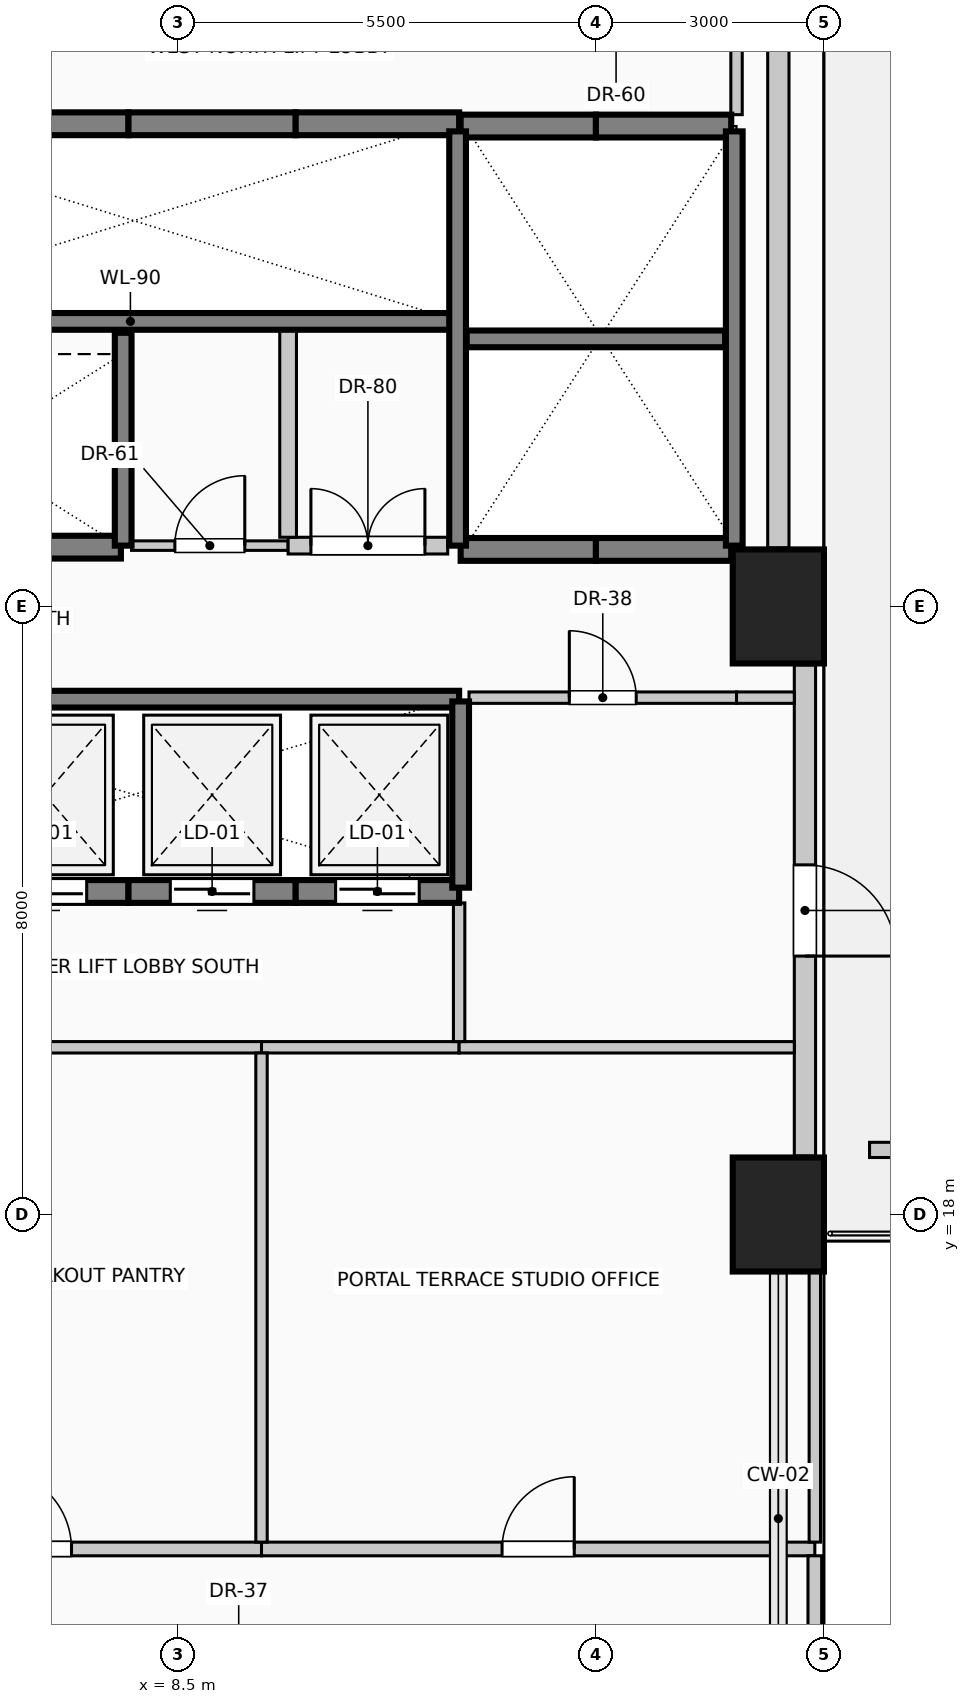
"""IFC4 building model, lengths in metres.
Left out: names, types, materials, properties, quantities, classifications, styles, units other than length and angle.
Written with IfcOpenShell. Run it as: python <this file> out.ifc"""

import sys

from ifc_helpers import new_model, si_unit, direction, frame, frame_2d, origin, origin_2d, place, context, subcontext, project, spatial, rectangle, extrude, element, fill, save


model = new_model("IFC4")
c1 = context("Model", 3, precision=1e-05, world=origin(), true_north=direction((0.0, 1.0)))
c2 = subcontext(c1, "Body", "Model", "MODEL_VIEW")
j1 = project(units=[si_unit("LENGTHUNIT", "METRE"), si_unit("PLANEANGLEUNIT", "RADIAN")], contexts=[c1])
p1 = place(None, origin())
s1 = spatial("IfcSite", under=j1, at=p1, CompositionType="ELEMENT")
p2 = place(p1, origin())
s2 = spatial("IfcBuilding", under=s1, at=p2, CompositionType="ELEMENT")
p3 = place(p2, frame((0.0, 0.0, 38.6)))
s3 = spatial("IfcBuildingStorey", under=s2, at=p3, CompositionType="ELEMENT", Elevation=38.6)
for number, where, z_axis, x_axis in (
    (1, (16.4, 18.0, 0.0), (0.0, 0.0, 1.0), (1.0, 0.0, 0.0)),
    (2, (16.4, 26.0, 0.0), (0.0, 0.0, 1.0), (1.0, 0.0, 0.0)),
):
    element("IfcColumn", number, at=place(p3, frame(where, z_axis=z_axis, x_axis=x_axis)), inside=s3, PredefinedType="COLUMN", context=c2, shape_type="SweptSolid", body=[
        extrude(rectangle(XDim=1.2, YDim=1.5, at=origin_2d()), origin(), (0.0, 0.0, 1.0), 4.0),
    ])
p4 = place(p3, frame((16.75, 25.23, 0.0), z_axis=(0.0, 0.0, 1.0), x_axis=(0.0, -1.0, 0.0)))
e3 = element("IfcWall", 3, at=p4, inside=s3, PredefinedType="SOLIDWALL", context=c2, shape_type="SweptSolid", body=[
    extrude(rectangle(XDim=6.46, YDim=0.28, at=frame_2d((3.23, 0.0))), origin(), (0.0, 0.0, 1.0), 3.7),
])
p5 = place(p4, frame((2.63, 0.0, 0.0)))
e4 = element("IfcOpeningElement", 4, at=p5, cuts=e3, PredefinedType="OPENING", context=c2, shape_type="SweptSolid", body=[
    extrude(rectangle(XDim=1.2, YDim=2.25, at=frame_2d((0.6, 1.125))), frame((0.0, 0.15, 0.0), z_axis=(0.0, -1.0, 0.0), x_axis=(1.0, 0.0, 0.0)), (0.0, 0.0, 1.0), 0.3),
])
p6 = place(p3, frame((16.4, 33.48, 0.0), z_axis=(0.0, 0.0, 1.0), x_axis=(0.0, -1.0, 0.0)))
e5 = element("IfcWall", 5, at=p6, inside=s3, PredefinedType="SOLIDWALL", context=c2, shape_type="SweptSolid", body=[
    extrude(rectangle(XDim=6.71, YDim=0.28, at=frame_2d((3.355, 0.0))), origin(), (0.0, 0.0, 1.0), 3.0),
])
p7 = place(p3, frame((17.6, 18.85, 0.0), z_axis=(0.0, 0.0, 1.0), x_axis=(1.0, 0.0, 0.0)))
e6 = element("IfcWall", 6, at=p7, inside=s3, PredefinedType="USERDEFINED", context=c2, shape_type="SweptSolid", body=[
    extrude(rectangle(XDim=22.8, YDim=0.2, at=frame_2d((11.4, 0.0))), origin(), (0.0, 0.0, 1.0), 0.55),
])
p8 = place(p3, frame((7.85, 22.25, 0.0), z_axis=(0.0, 0.0, 1.0), x_axis=(-1.0, 0.0, 0.0)))
e7 = element("IfcWall", 7, at=p8, inside=s3, PredefinedType="SOLIDWALL", context=c2, shape_type="SweptSolid", body=[
    extrude(rectangle(XDim=2.2, YDim=0.3, at=frame_2d((1.1, 0.0))), origin(), (0.0, 0.0, 1.0), 4.0),
])
p9 = place(p8, frame((0.55, 0.0, 0.0)))
e8 = element("IfcOpeningElement", 8, at=p9, cuts=e7, PredefinedType="OPENING", context=c2, shape_type="SweptSolid", body=[
    extrude(rectangle(XDim=1.1, YDim=2.2, at=frame_2d((0.55, 1.1))), frame((0.0, 0.16, 0.0), z_axis=(0.0, -1.0, 0.0), x_axis=(1.0, 0.0, 0.0)), (0.0, 0.0, 1.0), 0.32),
])
p10 = place(p3, frame((10.05, 22.25, 0.0), z_axis=(0.0, 0.0, 1.0), x_axis=(-1.0, 0.0, 0.0)))
e9 = element("IfcWall", 9, at=p10, inside=s3, PredefinedType="SOLIDWALL", context=c2, shape_type="SweptSolid", body=[
    extrude(rectangle(XDim=2.2, YDim=0.3, at=frame_2d((1.1, 0.0))), origin(), (0.0, 0.0, 1.0), 4.0),
])
p11 = place(p10, frame((0.55, 0.0, 0.0)))
e10 = element("IfcOpeningElement", 10, at=p11, cuts=e9, PredefinedType="OPENING", context=c2, shape_type="SweptSolid", body=[
    extrude(rectangle(XDim=1.1, YDim=2.2, at=frame_2d((0.55, 1.1))), frame((0.0, 0.16, 0.0), z_axis=(0.0, -1.0, 0.0), x_axis=(1.0, 0.0, 0.0)), (0.0, 0.0, 1.0), 0.32),
])
p12 = place(p3, frame((12.2, 22.25, 0.0), z_axis=(0.0, 0.0, 1.0), x_axis=(-1.0, 0.0, 0.0)))
e11 = element("IfcWall", 11, at=p12, inside=s3, PredefinedType="SOLIDWALL", context=c2, shape_type="SweptSolid", body=[
    extrude(rectangle(XDim=2.15, YDim=0.3, at=frame_2d((1.075, 0.0))), origin(), (0.0, 0.0, 1.0), 4.0),
])
p13 = place(p12, frame((0.525, 0.0, 0.0)))
e12 = element("IfcOpeningElement", 12, at=p13, cuts=e11, PredefinedType="OPENING", context=c2, shape_type="SweptSolid", body=[
    extrude(rectangle(XDim=1.1, YDim=2.2, at=frame_2d((0.55, 1.1))), frame((0.0, 0.16, 0.0), z_axis=(0.0, -1.0, 0.0), x_axis=(1.0, 0.0, 0.0)), (0.0, 0.0, 1.0), 0.32),
])
for number, where, z_axis, x_axis in (
    (13, (14.0, 26.75, 0.0), (0.0, 0.0, 1.0), (-1.0, 0.0, 0.0)),
    (14, (15.78, 26.75, 0.0), (0.0, 0.0, 1.0), (-1.0, 0.0, 0.0)),
    (15, (12.22, 32.32, 0.0), (0.0, 0.0, 1.0), (1.0, 0.0, 0.0)),
    (16, (14.0, 32.32, 0.0), (0.0, 0.0, 1.0), (1.0, 0.0, 0.0)),
):
    element("IfcWall", number, at=place(p3, frame(where, z_axis=z_axis, x_axis=x_axis)), inside=s3, PredefinedType="SOLIDWALL", context=c2, shape_type="SweptSolid", body=[
        extrude(rectangle(XDim=1.78, YDim=0.3, at=frame_2d((0.89, 0.0))), origin(), (0.0, 0.0, 1.0), 4.0),
    ])
p14 = place(p3, frame((5.65, 32.35, 0.0), z_axis=(0.0, 0.0, 1.0), x_axis=(1.0, 0.0, 0.0)))
e17 = element("IfcWall", 17, at=p14, inside=s3, PredefinedType="SOLIDWALL", context=c2, shape_type="SweptSolid", body=[
    extrude(rectangle(XDim=2.2, YDim=0.3, at=frame_2d((1.1, 0.0))), origin(), (0.0, 0.0, 1.0), 4.0),
])
p15 = place(p3, frame((7.85, 32.35, 0.0), z_axis=(0.0, 0.0, 1.0), x_axis=(1.0, 0.0, 0.0)))
e18 = element("IfcWall", 18, at=p15, inside=s3, PredefinedType="SOLIDWALL", context=c2, shape_type="SweptSolid", body=[
    extrude(rectangle(XDim=2.2, YDim=0.3, at=frame_2d((1.1, 0.0))), origin(), (0.0, 0.0, 1.0), 4.0),
])
p16 = place(p3, frame((10.05, 32.35, 0.0), z_axis=(0.0, 0.0, 1.0), x_axis=(1.0, 0.0, 0.0)))
e19 = element("IfcWall", 19, at=p16, inside=s3, PredefinedType="SOLIDWALL", context=c2, shape_type="SweptSolid", body=[
    extrude(rectangle(XDim=2.15, YDim=0.3, at=frame_2d((1.075, 0.0))), origin(), (0.0, 0.0, 1.0), 4.0),
])
p17 = place(p3, frame((7.75, 26.78, 0.0), z_axis=(0.0, 0.0, 1.0), x_axis=(-1.0, 0.0, 0.0)))
e20 = element("IfcWall", 20, at=p17, inside=s3, PredefinedType="SOLIDWALL", context=c2, shape_type="SweptSolid", body=[
    extrude(rectangle(XDim=2.1, YDim=0.3, at=frame_2d((1.05, 0.0))), origin(), (0.0, 0.0, 1.0), 4.0),
])
p18 = place(p3, frame((3.55, 29.75, 0.0), z_axis=(0.0, 0.0, 1.0), x_axis=(1.0, 0.0, 0.0)))
e21 = element("IfcWall", 21, at=p18, inside=s3, PredefinedType="SOLIDWALL", context=c2, shape_type="SweptSolid", body=[
    extrude(rectangle(XDim=8.65, YDim=0.22, at=frame_2d((4.325, 0.0))), origin(), (0.0, 0.0, 1.0), 4.0),
])
p19 = place(p3, frame((7.78, 26.8, 0.0), z_axis=(0.0, 0.0, 1.0), x_axis=(0.0, 1.0, 0.0)))
e22 = element("IfcWall", 22, at=p19, inside=s3, PredefinedType="SOLIDWALL", context=c2, shape_type="SweptSolid", body=[
    extrude(rectangle(XDim=2.8, YDim=0.22, at=frame_2d((1.4, 0.0))), origin(), (0.0, 0.0, 1.0), 4.0),
])
for number, where, z_axis, x_axis in (
    (23, (12.18, 26.8, 0.0), (0.0, 0.0, 1.0), (0.0, 1.0, 0.0)),
    (24, (15.82, 26.8, 0.0), (0.0, 0.0, 1.0), (0.0, 1.0, 0.0)),
):
    element("IfcWall", number, at=place(p3, frame(where, z_axis=z_axis, x_axis=x_axis)), inside=s3, PredefinedType="SOLIDWALL", context=c2, shape_type="SweptSolid", body=[
        extrude(rectangle(XDim=5.45, YDim=0.22, at=frame_2d((2.725, 0.0))), origin(), (0.0, 0.0, 1.0), 4.0),
    ])
p20 = place(p3, frame((12.3, 29.52, 0.0), z_axis=(0.0, 0.0, 1.0), x_axis=(1.0, 0.0, 0.0)))
e25 = element("IfcWall", 25, at=p20, inside=s3, PredefinedType="SOLIDWALL", context=c2, shape_type="SweptSolid", body=[
    extrude(rectangle(XDim=3.4, YDim=0.22, at=frame_2d((1.7, 0.0))), origin(), (0.0, 0.0, 1.0), 4.0),
])
p21 = place(p3, frame((3.55, 24.78, 0.0), z_axis=(0.0, 0.0, 1.0), x_axis=(1.0, 0.0, 0.0)))
e26 = element("IfcWall", 26, at=p21, inside=s3, PredefinedType="SOLIDWALL", context=c2, shape_type="SweptSolid", body=[
    extrude(rectangle(XDim=8.65, YDim=0.22, at=frame_2d((4.325, 0.0))), origin(), (0.0, 0.0, 1.0), 4.0),
])
p22 = place(p3, frame((12.22, 22.3, 0.0), z_axis=(0.0, 0.0, 1.0), x_axis=(0.0, 1.0, 0.0)))
e27 = element("IfcWall", 27, at=p22, inside=s3, PredefinedType="SOLIDWALL", context=c2, shape_type="SweptSolid", body=[
    extrude(rectangle(XDim=2.45, YDim=0.22, at=frame_2d((1.225, 0.0))), origin(), (0.0, 0.0, 1.0), 4.0),
])
p23 = place(p3, frame((3.55, 13.6, 0.0), z_axis=(0.0, 0.0, 1.0), x_axis=(1.0, 0.0, 0.0)))
e28 = element("IfcWall", 28, at=p23, inside=s3, PredefinedType="PARTITIONING", context=c2, shape_type="SweptSolid", body=[
    extrude(rectangle(XDim=6.05, YDim=0.18, at=frame_2d((3.025, 0.0))), origin(), (0.0, 0.0, 1.0), 3.7),
])
p24 = place(p23, frame((2.5, 0.0, 0.0)))
e29 = element("IfcOpeningElement", 29, at=p24, cuts=e28, PredefinedType="OPENING", context=c2, shape_type="SweptSolid", body=[
    extrude(rectangle(XDim=1.05, YDim=2.15, at=frame_2d((0.525, 1.075))), frame((0.0, 0.1, 0.0), z_axis=(0.0, -1.0, 0.0), x_axis=(1.0, 0.0, 0.0)), (0.0, 0.0, 1.0), 0.2),
])
p25 = place(p3, frame((9.6, 13.6, 0.0), z_axis=(0.0, 0.0, 1.0), x_axis=(1.0, 0.0, 0.0)))
e30 = element("IfcWall", 30, at=p25, inside=s3, PredefinedType="PARTITIONING", context=c2, shape_type="SweptSolid", body=[
    extrude(rectangle(XDim=7.28, YDim=0.18, at=frame_2d((3.64, 0.0))), origin(), (0.0, 0.0, 1.0), 3.7),
])
p26 = place(p25, frame((3.165, 0.0, 0.0)))
e31 = element("IfcOpeningElement", 31, at=p26, cuts=e30, PredefinedType="OPENING", context=c2, shape_type="SweptSolid", body=[
    extrude(rectangle(XDim=0.95, YDim=2.15, at=frame_2d((0.475, 1.075))), frame((0.0, 0.1, 0.0), z_axis=(0.0, -1.0, 0.0), x_axis=(1.0, 0.0, 0.0)), (0.0, 0.0, 1.0), 0.2),
])
p27 = place(p3, frame((3.55, 20.2, 0.0), z_axis=(0.0, 0.0, 1.0), x_axis=(1.0, 0.0, 0.0)))
e32 = element("IfcWall", 32, at=p27, inside=s3, PredefinedType="PARTITIONING", context=c2, shape_type="SweptSolid", body=[
    extrude(rectangle(XDim=6.05, YDim=0.15, at=frame_2d((3.025, 0.0))), origin(), (0.0, 0.0, 1.0), 3.7),
])
p28 = place(p3, frame((9.6, 20.2, 0.0), z_axis=(0.0, 0.0, 1.0), x_axis=(1.0, 0.0, 0.0)))
e33 = element("IfcWall", 33, at=p28, inside=s3, PredefinedType="PARTITIONING", context=c2, shape_type="SweptSolid", body=[
    extrude(rectangle(XDim=2.6, YDim=0.15, at=frame_2d((1.3, 0.0))), origin(), (0.0, 0.0, 1.0), 3.7),
])
p29 = place(p3, frame((12.2, 20.2, 0.0), z_axis=(0.0, 0.0, 1.0), x_axis=(1.0, 0.0, 0.0)))
e34 = element("IfcWall", 34, at=p29, inside=s3, PredefinedType="PARTITIONING", context=c2, shape_type="SweptSolid", body=[
    extrude(rectangle(XDim=4.41, YDim=0.15, at=frame_2d((2.205, 0.0))), origin(), (0.0, 0.0, 1.0), 3.7),
])
p30 = place(p3, frame((12.33, 24.8, 0.0), z_axis=(0.0, 0.0, 1.0), x_axis=(1.0, 0.0, 0.0)))
e35 = element("IfcWall", 35, at=p30, inside=s3, PredefinedType="PARTITIONING", context=c2, shape_type="SweptSolid", body=[
    extrude(rectangle(XDim=3.52, YDim=0.15, at=frame_2d((1.76, 0.0))), origin(), (0.0, 0.0, 1.0), 3.7),
])
p31 = place(p30, frame((1.32, 0.0, 0.0)))
e36 = element("IfcOpeningElement", 36, at=p31, cuts=e35, PredefinedType="OPENING", context=c2, shape_type="SweptSolid", body=[
    extrude(rectangle(XDim=0.88, YDim=2.1, at=frame_2d((0.44, 1.05))), frame((0.0, 0.085, 0.0), z_axis=(0.0, -1.0, 0.0), x_axis=(1.0, 0.0, 0.0)), (0.0, 0.0, 1.0), 0.17),
])
p32 = place(p3, frame((15.85, 24.8, 0.0), z_axis=(0.0, 0.0, 1.0), x_axis=(1.0, 0.0, 0.0)))
e37 = element("IfcWall", 37, at=p32, inside=s3, PredefinedType="PARTITIONING", context=c2, shape_type="SweptSolid", body=[
    extrude(rectangle(XDim=0.76, YDim=0.15, at=frame_2d((0.38, 0.0))), origin(), (0.0, 0.0, 1.0), 3.7),
])
p33 = place(p3, frame((7.89, 26.8, 0.0), z_axis=(0.0, 0.0, 1.0), x_axis=(1.0, 0.0, 0.0)))
e38 = element("IfcWall", 38, at=p33, inside=s3, PredefinedType="PARTITIONING", context=c2, shape_type="SweptSolid", body=[
    extrude(rectangle(XDim=2.06, YDim=0.125, at=frame_2d((1.03, 0.0))), origin(), (0.0, 0.0, 1.0), 3.7),
])
p34 = place(p33, frame((0.57, 0.0, 0.0)))
e39 = element("IfcOpeningElement", 39, at=p34, cuts=e38, PredefinedType="OPENING", context=c2, shape_type="SweptSolid", body=[
    extrude(rectangle(XDim=0.92, YDim=2.1, at=frame_2d((0.46, 1.05))), frame((0.0, 0.073, 0.0), z_axis=(0.0, -1.0, 0.0), x_axis=(1.0, 0.0, 0.0)), (0.0, 0.0, 1.0), 0.145),
])
p35 = place(p3, frame((9.95, 26.8, 0.0), z_axis=(0.0, 0.0, 1.0), x_axis=(1.0, 0.0, 0.0)))
e40 = element("IfcWall", 40, at=p35, inside=s3, PredefinedType="PARTITIONING", context=c2, shape_type="SweptSolid", body=[
    extrude(rectangle(XDim=2.1, YDim=0.22, at=frame_2d((1.05, 0.0))), origin(), (0.0, 0.0, 1.0), 3.7),
])
p36 = place(p35, frame((0.3, 0.0, 0.0)))
e41 = element("IfcOpeningElement", 41, at=p36, cuts=e40, PredefinedType="OPENING", context=c2, shape_type="SweptSolid", body=[
    extrude(rectangle(XDim=1.5, YDim=2.25, at=frame_2d((0.75, 1.125))), frame((0.0, 0.12, 0.0), z_axis=(0.0, -1.0, 0.0), x_axis=(1.0, 0.0, 0.0)), (0.0, 0.0, 1.0), 0.24),
])
p37 = place(p3, frame((9.6, 13.69, 0.0), z_axis=(0.0, 0.0, 1.0), x_axis=(0.0, 1.0, 0.0)))
e42 = element("IfcWall", 42, at=p37, inside=s3, PredefinedType="PARTITIONING", context=c2, shape_type="SweptSolid", body=[
    extrude(rectangle(XDim=6.435, YDim=0.15, at=frame_2d((3.218, 0.0))), origin(), (0.0, 0.0, 1.0), 3.7),
])
p38 = place(p3, frame((9.95, 26.91, 0.0), z_axis=(0.0, 0.0, 1.0), x_axis=(0.0, 1.0, 0.0)))
e43 = element("IfcWall", 43, at=p38, inside=s3, PredefinedType="PARTITIONING", context=c2, shape_type="SweptSolid", body=[
    extrude(rectangle(XDim=2.73, YDim=0.22, at=frame_2d((1.365, 0.0))), origin(), (0.0, 0.0, 1.0), 3.7),
])
p39 = place(p3, frame((12.2, 20.275, 0.0), z_axis=(0.0, 0.0, 1.0), x_axis=(0.0, 1.0, 0.0)))
e44 = element("IfcWall", 44, at=p39, inside=s3, PredefinedType="PARTITIONING", context=c2, shape_type="SweptSolid", body=[
    extrude(rectangle(XDim=1.825, YDim=0.15, at=frame_2d((0.913, 0.0))), origin(), (0.0, 0.0, 1.0), 3.7),
])
p40 = place(p3, frame((15.85, 32.47, 0.0), z_axis=(0.0, 0.0, 1.0), x_axis=(0.0, 1.0, 0.0)))
e45 = element("IfcWall", 45, at=p40, inside=s3, PredefinedType="PARTITIONING", context=c2, shape_type="SweptSolid", body=[
    extrude(rectangle(XDim=1.03, YDim=0.15, at=frame_2d((0.515, 0.0))), origin(), (0.0, 0.0, 1.0), 3.7),
])
p41 = place(p3, frame((16.88, 11.49, 0.0), z_axis=(0.0, 0.0, 1.0), x_axis=(0.0, 1.0, 0.0)))
e46 = element("IfcWall", 46, at=p41, inside=s3, PredefinedType="PARTITIONING", context=c2, shape_type="SweptSolid", body=[
    extrude(rectangle(XDim=2.02, YDim=0.18, at=frame_2d((1.01, 0.0))), origin(), (0.0, 0.0, 1.0), 3.7),
])
p42 = place(p3, frame((16.88, 13.69, 0.0), z_axis=(0.0, 0.0, 1.0), x_axis=(0.0, 1.0, 0.0)))
e47 = element("IfcWall", 47, at=p42, inside=s3, PredefinedType="PARTITIONING", context=c2, shape_type="SweptSolid", body=[
    extrude(rectangle(XDim=3.56, YDim=0.15, at=frame_2d((1.78, 0.0))), origin(), (0.0, 0.0, 1.0), 3.7),
])
p43 = place(p5, origin())
e48 = element("IfcDoor", 48, at=p43, inside=s3, OperationType="SINGLE_SWING_RIGHT", PredefinedType="DOOR", context=c2, shape_type="SweptSolid", body=[
    extrude(rectangle(XDim=1.2, YDim=2.25, at=frame_2d((0.6, 1.125))), frame((0.0, 0.025, 0.0), z_axis=(0.0, -1.0, 0.0), x_axis=(1.0, 0.0, 0.0)), (0.0, 0.0, 1.0), 0.05),
])
fill(e4, e48)
p44 = place(p9, origin())
e49 = element("IfcDoor", 49, at=p44, inside=s3, OperationType="SLIDING_TO_RIGHT", PredefinedType="DOOR", context=c2, shape_type="SweptSolid", body=[
    extrude(rectangle(XDim=1.1, YDim=2.2, at=frame_2d((0.55, 1.1))), frame((0.0, 0.025, 0.0), z_axis=(0.0, -1.0, 0.0), x_axis=(1.0, 0.0, 0.0)), (0.0, 0.0, 1.0), 0.05),
])
fill(e8, e49)
p45 = place(p11, origin())
e50 = element("IfcDoor", 50, at=p45, inside=s3, OperationType="SLIDING_TO_LEFT", PredefinedType="DOOR", context=c2, shape_type="SweptSolid", body=[
    extrude(rectangle(XDim=1.1, YDim=2.2, at=frame_2d((0.55, 1.1))), frame((0.0, 0.025, 0.0), z_axis=(0.0, -1.0, 0.0), x_axis=(1.0, 0.0, 0.0)), (0.0, 0.0, 1.0), 0.05),
])
fill(e10, e50)
p46 = place(p13, origin())
e51 = element("IfcDoor", 51, at=p46, inside=s3, OperationType="SLIDING_TO_RIGHT", PredefinedType="DOOR", context=c2, shape_type="SweptSolid", body=[
    extrude(rectangle(XDim=1.1, YDim=2.2, at=frame_2d((0.55, 1.1))), frame((0.0, 0.025, 0.0), z_axis=(0.0, -1.0, 0.0), x_axis=(1.0, 0.0, 0.0)), (0.0, 0.0, 1.0), 0.05),
])
fill(e12, e51)
p47 = place(p24, origin())
e52 = element("IfcDoor", 52, at=p47, inside=s3, OperationType="SINGLE_SWING_LEFT", PredefinedType="DOOR", context=c2, shape_type="SweptSolid", body=[
    extrude(rectangle(XDim=1.05, YDim=2.15, at=frame_2d((0.525, 1.075))), frame((0.0, 0.025, 0.0), z_axis=(0.0, -1.0, 0.0), x_axis=(1.0, 0.0, 0.0)), (0.0, 0.0, 1.0), 0.05),
])
fill(e29, e52)
p48 = place(p26, origin())
e53 = element("IfcDoor", 53, at=p48, inside=s3, OperationType="SINGLE_SWING_RIGHT", PredefinedType="DOOR", context=c2, shape_type="SweptSolid", body=[
    extrude(rectangle(XDim=0.95, YDim=2.15, at=frame_2d((0.475, 1.075))), frame((0.0, 0.025, 0.0), z_axis=(0.0, -1.0, 0.0), x_axis=(1.0, 0.0, 0.0)), (0.0, 0.0, 1.0), 0.05),
])
fill(e31, e53)
p49 = place(p31, origin())
e54 = element("IfcDoor", 54, at=p49, inside=s3, OperationType="SINGLE_SWING_LEFT", PredefinedType="DOOR", context=c2, shape_type="SweptSolid", body=[
    extrude(rectangle(XDim=0.88, YDim=2.1, at=frame_2d((0.44, 1.05))), frame((0.0, 0.025, 0.0), z_axis=(0.0, -1.0, 0.0), x_axis=(1.0, 0.0, 0.0)), (0.0, 0.0, 1.0), 0.05),
])
fill(e36, e54)
p50 = place(p34, origin())
e55 = element("IfcDoor", 55, at=p50, inside=s3, OperationType="SINGLE_SWING_RIGHT", PredefinedType="DOOR", context=c2, shape_type="SweptSolid", body=[
    extrude(rectangle(XDim=0.92, YDim=2.1, at=frame_2d((0.46, 1.05))), frame((0.0, 0.025, 0.0), z_axis=(0.0, -1.0, 0.0), x_axis=(1.0, 0.0, 0.0)), (0.0, 0.0, 1.0), 0.05),
])
fill(e39, e55)
p51 = place(p36, origin())
e56 = element("IfcDoor", 56, at=p51, inside=s3, OperationType="DOUBLE_DOOR_SINGLE_SWING", PredefinedType="DOOR", context=c2, shape_type="SweptSolid", body=[
    extrude(rectangle(XDim=1.5, YDim=2.25, at=frame_2d((0.75, 1.125))), frame((0.0, 0.025, 0.0), z_axis=(0.0, -1.0, 0.0), x_axis=(1.0, 0.0, 0.0)), (0.0, 0.0, 1.0), 0.05),
])
fill(e41, e56)
save(model, sys.argv[1])
